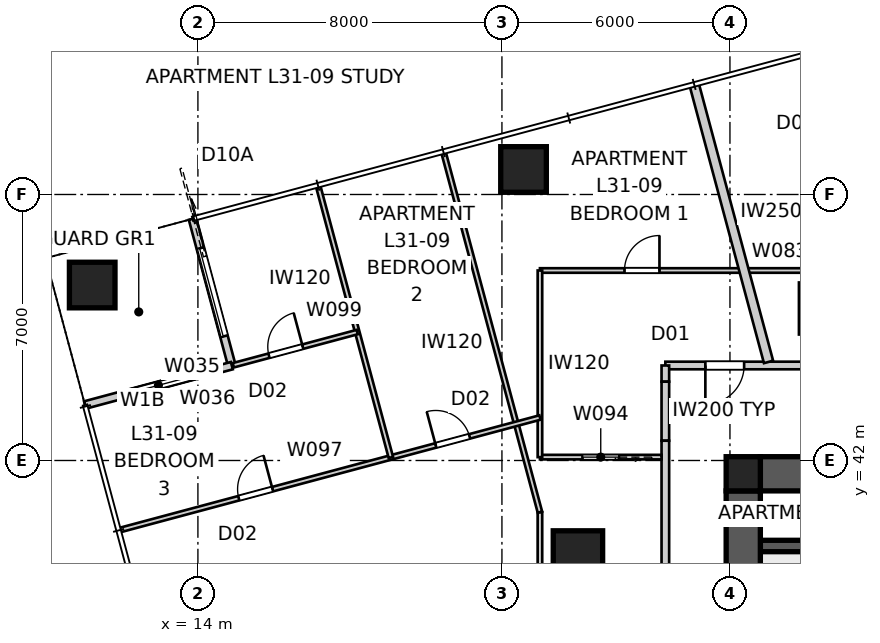
"""IFC4 building model, lengths in metres.
Left out: names, types, materials, properties, quantities, classifications, styles, units other than length and angle.
Written with IfcOpenShell. Run it as: python <this file> out.ifc"""

import sys

from ifc_helpers import new_model, si_unit, direction, frame, frame_2d, origin, origin_2d, place, context, subcontext, project, spatial, polyline, rectangle, outline, extrude, element, fill, save


model = new_model("IFC4")
c1 = context("Model", 3, precision=1e-05, world=origin(), true_north=direction((0.0, 1.0)))
c2 = subcontext(c1, "Body", "Model", "MODEL_VIEW")
j1 = project(units=[si_unit("LENGTHUNIT", "METRE"), si_unit("PLANEANGLEUNIT", "RADIAN")], contexts=[c1])
p1 = place(None, origin())
s1 = spatial("IfcSite", under=j1, at=p1, CompositionType="ELEMENT")
p2 = place(p1, origin())
s2 = spatial("IfcBuilding", under=s1, at=p2, CompositionType="ELEMENT")
p3 = place(p2, frame((0.0, 0.0, 115.0)))
s3 = spatial("IfcBuildingStorey", under=s2, at=p3, CompositionType="ELEMENT", Elevation=115.0)
p4 = place(p3, frame((28.8, 41.65, 0.0), z_axis=(0.0, 0.0, 1.0), x_axis=(1.0, 0.0, 0.0)))
e1 = element("IfcWall", 1, at=p4, inside=s3, PredefinedType="SHEAR", context=c2, shape_type="SweptSolid", body=[
    extrude(outline(polyline([(0.0, -0.45), (22.4, -0.45), (22.4, -0.025), (22.85, -0.025), (22.85, 0.025), (22.4, 0.025), (22.4, 0.45), (0.0, 0.45), (0.0, 0.025), (-0.45, 0.025), (-0.45, -0.025), (0.0, -0.025), (0.0, -0.45)])), origin(), (0.0, 0.0, 1.0), 3.4),
])
p5 = place(p3, frame((28.35, 41.2, 0.0), z_axis=(0.0, 0.0, 1.0), x_axis=(0.0, -1.0, 0.0)))
e2 = element("IfcWall", 2, at=p5, inside=s3, PredefinedType="SHEAR", context=c2, shape_type="SweptSolid", body=[
    extrude(outline(polyline([(0.0, -0.45), (22.4, -0.45), (22.4, -0.025), (22.85, -0.025), (22.85, 0.025), (22.4, 0.025), (22.4, 0.45), (0.0, 0.45), (0.0, 0.025), (-0.45, 0.025), (-0.45, -0.025), (0.0, -0.025), (0.0, -0.45)])), origin(), (0.0, 0.0, 1.0), 3.4),
])
p6 = place(p5, frame((11.14, 0.0, 0.0)))
e3 = element("IfcOpeningElement", 3, at=p6, cuts=e2, PredefinedType="OPENING", context=c2, shape_type="SweptSolid", body=[
    extrude(rectangle(XDim=1.02, YDim=2.4, at=frame_2d((0.51, 1.2))), frame((0.0, 0.46, 0.0), z_axis=(0.0, -1.0, 0.0), x_axis=(1.0, 0.0, 0.0)), (0.0, 0.0, 1.0), 0.92),
])
p7 = place(p3, frame((28.8, 39.75, 0.0), z_axis=(0.0, 0.0, 1.0), x_axis=(1.0, 0.0, 0.0)))
e4 = element("IfcWall", 4, at=p7, inside=s3, PredefinedType="SHEAR", context=c2, shape_type="SweptSolid", body=[
    extrude(rectangle(XDim=3.5, YDim=0.3, at=frame_2d((1.75, 0.0))), origin(), (0.0, 0.0, 1.0), 3.4),
])
p8 = place(p3, frame((28.35, 41.65, 0.0), z_axis=(0.0, 0.0, 1.0), x_axis=(1.0, 0.0, 0.0)))
e5 = element("IfcColumn", 5, at=p8, inside=s3, PredefinedType="COLUMN", context=c2, shape_type="SweptSolid", body=[
    extrude(rectangle(XDim=0.9, YDim=0.9, at=origin_2d()), origin(), (0.0, 0.0, 1.0), 3.4),
])
for number, where, z_axis, x_axis in (
    (6, (22.568, 49.658, 0.0), (0.0, 0.0, 1.0), (1.0, 0.0, 0.0)),
    (7, (11.219, 46.617, 0.0), (0.0, 0.0, 1.0), (1.0, 0.0, 0.0)),
):
    element("IfcColumn", number, at=place(p3, frame(where, z_axis=z_axis, x_axis=x_axis)), inside=s3, PredefinedType="COLUMN", context=c2, shape_type="SweptSolid", body=[
        extrude(rectangle(XDim=1.2, YDim=1.2, at=origin_2d()), origin(), (0.0, 0.0, 1.0), 3.4),
    ])
for number, where, z_axis, x_axis in (
    (8, (30.5, 46.0, 0.0), (0.0, 0.0, 1.0), (1.0, 0.0, 0.0)),
    (9, (24.0, 39.5, 0.0), (0.0, 0.0, 1.0), (1.0, 0.0, 0.0)),
):
    element("IfcColumn", number, at=place(p3, frame(where, z_axis=z_axis, x_axis=x_axis)), inside=s3, PredefinedType="COLUMN", context=c2, shape_type="SweptSolid", body=[
        extrude(rectangle(XDim=1.3, YDim=1.3, at=origin_2d()), origin(), (0.0, 0.0, 1.0), 3.4),
    ])
p9 = place(p3, frame((13.857, 48.359, 0.0), z_axis=(0.0, 0.0, 1.0), x_axis=(0.258843877716, -0.965919172068, 0.0)))
e10 = element("IfcWall", 10, at=p9, inside=s3, PredefinedType="SOLIDWALL", context=c2, shape_type="SweptSolid", body=[
    extrude(rectangle(XDim=4.0, YDim=0.2, at=frame_2d((2.0, 0.0))), origin(), (0.0, 0.0, 1.0), 3.25),
])
p10 = place(p9, frame((0.8, 0.0, 0.0)))
e11 = element("IfcOpeningElement", 11, at=p10, cuts=e10, PredefinedType="OPENING", context=c2, shape_type="SweptSolid", body=[
    extrude(rectangle(XDim=2.4, YDim=2.1, at=frame_2d((1.2, 1.05))), frame((0.0, 0.11, 0.0), z_axis=(0.0, -1.0, 0.0), x_axis=(1.0, 0.0, 0.0)), (0.0, 0.0, 1.0), 0.22),
])
p11 = place(p3, frame((14.893, 44.496, 0.0), z_axis=(0.0, 0.0, 1.0), x_axis=(-0.965934430412, -0.258786931944, 0.0)))
e12 = element("IfcWall", 12, at=p11, inside=s3, PredefinedType="SOLIDWALL", context=c2, shape_type="SweptSolid", body=[
    extrude(rectangle(XDim=4.0, YDim=0.2, at=frame_2d((2.0, 0.0))), origin(), (0.0, 0.0, 1.0), 3.25),
])
p12 = place(p11, frame((1.0, 0.0, 0.45)))
e13 = element("IfcOpeningElement", 13, at=p12, cuts=e12, PredefinedType="OPENING", context=c2, shape_type="SweptSolid", body=[
    extrude(rectangle(XDim=2.0, YDim=1.8, at=frame_2d((1.0, 0.9))), frame((0.0, 0.11, 0.0), z_axis=(0.0, -1.0, 0.0), x_axis=(1.0, 0.0, 0.0)), (0.0, 0.0, 1.0), 0.22),
])
p13 = place(p3, frame((54.5, 44.5, 0.0), z_axis=(0.0, 0.0, 1.0), x_axis=(-1.0, 0.0, 0.0)))
e14 = element("IfcWall", 14, at=p13, inside=s3, PredefinedType="PARTITIONING", context=c2, shape_type="SweptSolid", body=[
    extrude(rectangle(XDim=28.2, YDim=0.2, at=frame_2d((14.1, 0.0))), origin(), (0.0, 0.0, 1.0), 3.25),
])
p14 = place(p13, frame((10.837, 0.0, 0.0)))
e15 = element("IfcOpeningElement", 15, at=p14, cuts=e14, PredefinedType="OPENING", context=c2, shape_type="SweptSolid", body=[
    extrude(rectangle(XDim=1.02, YDim=2.34, at=frame_2d((0.51, 1.17))), frame((0.0, 0.11, 0.0), z_axis=(0.0, -1.0, 0.0), x_axis=(1.0, 0.0, 0.0)), (0.0, 0.0, 1.0), 0.22),
])
p15 = place(p13, frame((5.7, 0.0, 0.0)))
e16 = element("IfcOpeningElement", 16, at=p15, cuts=e14, PredefinedType="OPENING", context=c2, shape_type="SweptSolid", body=[
    extrude(rectangle(XDim=1.02, YDim=2.34, at=frame_2d((0.51, 1.17))), frame((0.0, 0.11, 0.0), z_axis=(0.0, -1.0, 0.0), x_axis=(1.0, 0.0, 0.0)), (0.0, 0.0, 1.0), 0.22),
])
p16 = place(p13, frame((26.127, 0.0, 0.0)))
e17 = element("IfcOpeningElement", 17, at=p16, cuts=e14, PredefinedType="OPENING", context=c2, shape_type="SweptSolid", body=[
    extrude(rectangle(XDim=1.02, YDim=2.34, at=frame_2d((0.51, 1.17))), frame((0.0, 0.11, 0.0), z_axis=(0.0, -1.0, 0.0), x_axis=(1.0, 0.0, 0.0)), (0.0, 0.0, 1.0), 0.22),
])
p17 = place(p3, frame((26.3, 44.5, 0.0), z_axis=(0.0, 0.0, 1.0), x_axis=(0.0, -1.0, 0.0)))
e18 = element("IfcWall", 18, at=p17, inside=s3, PredefinedType="PARTITIONING", context=c2, shape_type="SweptSolid", body=[
    extrude(rectangle(XDim=0.426, YDim=0.2, at=frame_2d((0.213, 0.0))), origin(), (0.0, 0.0, 1.0), 3.25),
])
p18 = place(p3, frame((26.3, 44.074, 0.0), z_axis=(0.0, 0.0, 1.0), x_axis=(0.0, -1.0, 0.0)))
e19 = element("IfcWall", 19, at=p18, inside=s3, PredefinedType="PARTITIONING", context=c2, shape_type="SweptSolid", body=[
    extrude(rectangle(XDim=1.554, YDim=0.2, at=frame_2d((0.777, 0.0))), origin(), (0.0, 0.0, 1.0), 2.722),
])
p19 = place(p3, frame((26.3, 42.52, 0.0), z_axis=(0.0, 0.0, 1.0), x_axis=(0.0, -1.0, 0.0)))
e20 = element("IfcWall", 20, at=p19, inside=s3, PredefinedType="PARTITIONING", context=c2, shape_type="SweptSolid", body=[
    extrude(rectangle(XDim=27.02, YDim=0.2, at=frame_2d((13.51, 0.0))), origin(), (0.0, 0.0, 1.0), 3.25),
])
p20 = place(p19, frame((23.584, 0.0, 0.0)))
e21 = element("IfcOpeningElement", 21, at=p20, cuts=e20, PredefinedType="OPENING", context=c2, shape_type="SweptSolid", body=[
    extrude(rectangle(XDim=1.02, YDim=2.1, at=frame_2d((0.51, 1.05))), frame((0.0, 0.11, 0.0), z_axis=(0.0, -1.0, 0.0), x_axis=(1.0, 0.0, 0.0)), (0.0, 0.0, 1.0), 0.22),
])
p21 = place(p19, frame((13.468, 0.0, 0.0)))
e22 = element("IfcOpeningElement", 22, at=p21, cuts=e20, PredefinedType="OPENING", context=c2, shape_type="SweptSolid", body=[
    extrude(rectangle(XDim=1.02, YDim=2.34, at=frame_2d((0.51, 1.17))), frame((0.0, 0.11, 0.0), z_axis=(0.0, -1.0, 0.0), x_axis=(1.0, 0.0, 0.0)), (0.0, 0.0, 1.0), 0.22),
])
p22 = place(p3, frame((27.058, 51.896, 0.0), z_axis=(0.0, 0.0, 1.0), x_axis=(0.258822171171, -0.965924988656, 0.0)))
e23 = element("IfcWall", 23, at=p22, inside=s3, PredefinedType="PARTITIONING", context=c2, shape_type="SweptSolid", body=[
    extrude(rectangle(XDim=7.56, YDim=0.25, at=frame_2d((3.78, 0.0))), origin(), (0.0, 0.0, 1.0), 3.25),
])
p23 = place(p3, frame((23.0, 13.0, 0.0), z_axis=(0.0, 0.0, 1.0), x_axis=(0.0, 1.0, 0.0)))
e24 = element("IfcWall", 24, at=p23, inside=s3, PredefinedType="PARTITIONING", context=c2, shape_type="SweptSolid", body=[
    extrude(rectangle(XDim=27.64, YDim=0.12, at=frame_2d((13.82, 0.0))), origin(), (0.0, 0.0, 1.0), 2.55),
])
p24 = place(p23, frame((3.192, 0.0, 0.0)))
e25 = element("IfcOpeningElement", 25, at=p24, cuts=e24, PredefinedType="OPENING", context=c2, shape_type="SweptSolid", body=[
    extrude(rectangle(XDim=0.92, YDim=2.34, at=frame_2d((0.46, 1.17))), frame((0.0, 0.07, 0.0), z_axis=(0.0, -1.0, 0.0), x_axis=(1.0, 0.0, 0.0)), (0.0, 0.0, 1.0), 0.14),
])
p25 = place(p23, frame((13.779, 0.0, 0.0)))
e26 = element("IfcOpeningElement", 26, at=p25, cuts=e24, PredefinedType="OPENING", context=c2, shape_type="SweptSolid", body=[
    extrude(rectangle(XDim=0.92, YDim=2.34, at=frame_2d((0.46, 1.17))), frame((0.0, 0.07, 0.0), z_axis=(0.0, -1.0, 0.0), x_axis=(1.0, 0.0, 0.0)), (0.0, 0.0, 1.0), 0.14),
])
p26 = place(p23, frame((16.374, 0.0, 0.0)))
e27 = element("IfcOpeningElement", 27, at=p26, cuts=e24, PredefinedType="OPENING", context=c2, shape_type="SweptSolid", body=[
    extrude(rectangle(XDim=0.92, YDim=2.34, at=frame_2d((0.46, 1.17))), frame((0.0, 0.07, 0.0), z_axis=(0.0, -1.0, 0.0), x_axis=(1.0, 0.0, 0.0)), (0.0, 0.0, 1.0), 0.14),
])
p27 = place(p23, frame((9.743, 0.0, 0.0)))
e28 = element("IfcOpeningElement", 28, at=p27, cuts=e24, PredefinedType="OPENING", context=c2, shape_type="SweptSolid", body=[
    extrude(rectangle(XDim=0.96, YDim=2.1, at=frame_2d((0.48, 1.05))), frame((0.0, 0.07, 0.0), z_axis=(0.0, -1.0, 0.0), x_axis=(1.0, 0.0, 0.0)), (0.0, 0.0, 1.0), 0.14),
])
p28 = place(p23, frame((24.879, 0.0, 0.0)))
e29 = element("IfcOpeningElement", 29, at=p28, cuts=e24, PredefinedType="OPENING", context=c2, shape_type="SweptSolid", body=[
    extrude(rectangle(XDim=0.96, YDim=2.1, at=frame_2d((0.48, 1.05))), frame((0.0, 0.07, 0.0), z_axis=(0.0, -1.0, 0.0), x_axis=(1.0, 0.0, 0.0)), (0.0, 0.0, 1.0), 0.14),
])
p29 = place(p3, frame((23.0, 47.0, 0.0), z_axis=(0.0, 0.0, 1.0), x_axis=(1.0, 0.0, 0.0)))
e30 = element("IfcWall", 30, at=p29, inside=s3, PredefinedType="PARTITIONING", context=c2, shape_type="SweptSolid", body=[
    extrude(rectangle(XDim=25.241, YDim=0.12, at=frame_2d((12.62, 0.0))), origin(), (0.0, 0.0, 1.0), 2.55),
])
p30 = place(p29, frame((21.702, 0.0, 0.0)))
e31 = element("IfcOpeningElement", 31, at=p30, cuts=e30, PredefinedType="OPENING", context=c2, shape_type="SweptSolid", body=[
    extrude(rectangle(XDim=0.92, YDim=2.34, at=frame_2d((0.46, 1.17))), frame((0.0, 0.07, 0.0), z_axis=(0.0, -1.0, 0.0), x_axis=(1.0, 0.0, 0.0)), (0.0, 0.0, 1.0), 0.14),
])
p31 = place(p29, frame((17.598, 0.0, 0.0)))
e32 = element("IfcOpeningElement", 32, at=p31, cuts=e30, PredefinedType="OPENING", context=c2, shape_type="SweptSolid", body=[
    extrude(rectangle(XDim=0.92, YDim=2.34, at=frame_2d((0.46, 1.17))), frame((0.0, 0.07, 0.0), z_axis=(0.0, -1.0, 0.0), x_axis=(1.0, 0.0, 0.0)), (0.0, 0.0, 1.0), 0.14),
])
p32 = place(p29, frame((23.689, 0.0, 0.0)))
e33 = element("IfcOpeningElement", 33, at=p32, cuts=e30, PredefinedType="OPENING", context=c2, shape_type="SweptSolid", body=[
    extrude(rectangle(XDim=0.92, YDim=2.34, at=frame_2d((0.46, 1.17))), frame((0.0, 0.07, 0.0), z_axis=(0.0, -1.0, 0.0), x_axis=(1.0, 0.0, 0.0)), (0.0, 0.0, 1.0), 0.14),
])
p33 = place(p29, frame((2.225, 0.0, 0.0)))
e34 = element("IfcOpeningElement", 34, at=p33, cuts=e30, PredefinedType="OPENING", context=c2, shape_type="SweptSolid", body=[
    extrude(rectangle(XDim=0.92, YDim=2.34, at=frame_2d((0.46, 1.17))), frame((0.0, 0.07, 0.0), z_axis=(0.0, -1.0, 0.0), x_axis=(1.0, 0.0, 0.0)), (0.0, 0.0, 1.0), 0.14),
])
p34 = place(p29, frame((13.709, 0.0, 0.0)))
e35 = element("IfcOpeningElement", 35, at=p34, cuts=e30, PredefinedType="OPENING", context=c2, shape_type="SweptSolid", body=[
    extrude(rectangle(XDim=0.96, YDim=2.1, at=frame_2d((0.48, 1.05))), frame((0.0, 0.07, 0.0), z_axis=(0.0, -1.0, 0.0), x_axis=(1.0, 0.0, 0.0)), (0.0, 0.0, 1.0), 0.14),
])
p35 = place(p3, frame((26.2, 42.089, 0.0), z_axis=(0.0, 0.0, 1.0), x_axis=(-1.0, 0.0, 0.0)))
e36 = element("IfcWall", 36, at=p35, inside=s3, PredefinedType="PARTITIONING", context=c2, shape_type="SweptSolid", body=[
    extrude(rectangle(XDim=3.2, YDim=0.12, at=frame_2d((1.6, 0.0))), origin(), (0.0, 0.0, 1.0), 3.25),
])
p36 = place(p35, frame((1.12, 0.0, 0.0)))
e37 = element("IfcOpeningElement", 37, at=p36, cuts=e36, PredefinedType="OPENING", context=c2, shape_type="SweptSolid", body=[
    extrude(rectangle(XDim=0.96, YDim=2.1, at=frame_2d((0.48, 1.05))), frame((0.0, 0.07, 0.0), z_axis=(0.0, -1.0, 0.0), x_axis=(1.0, 0.0, 0.0)), (0.0, 0.0, 1.0), 0.14),
])
p37 = place(p3, frame((23.0, 42.089, 0.0), z_axis=(0.0, 0.0, 1.0), x_axis=(0.0, 1.0, 0.0)))
e38 = element("IfcWall", 38, at=p37, inside=s3, PredefinedType="PARTITIONING", context=c2, shape_type="SweptSolid", body=[
    extrude(rectangle(XDim=4.911, YDim=0.12, at=frame_2d((2.456, 0.0))), origin(), (0.0, 0.0, 1.0), 3.25),
])
p38 = place(p3, frame((23.0, 40.64, 0.0), z_axis=(0.0, 0.0, 1.0), x_axis=(-0.258790139317, 0.965933571108, 0.0)))
e39 = element("IfcWall", 39, at=p38, inside=s3, PredefinedType="PARTITIONING", context=c2, shape_type="SweptSolid", body=[
    extrude(rectangle(XDim=9.783, YDim=0.12, at=frame_2d((4.892, 0.0))), origin(), (0.0, 0.0, 1.0), 2.638),
])
p39 = place(p3, frame((11.952, 40.17, 0.0), z_axis=(0.0, 0.0, 1.0), x_axis=(0.965923183761, 0.258828906952, 0.0)))
e40 = element("IfcWall", 40, at=p39, inside=s3, PredefinedType="PARTITIONING", context=c2, shape_type="SweptSolid", body=[
    extrude(rectangle(XDim=11.438, YDim=0.12, at=frame_2d((5.719, 0.0))), origin(), (0.0, 0.0, 1.0), 3.25),
])
p40 = place(p39, frame((3.233, 0.0, 0.0)))
e41 = element("IfcOpeningElement", 41, at=p40, cuts=e40, PredefinedType="OPENING", context=c2, shape_type="SweptSolid", body=[
    extrude(rectangle(XDim=0.92, YDim=2.34, at=frame_2d((0.46, 1.17))), frame((0.0, 0.07, 0.0), z_axis=(0.0, -1.0, 0.0), x_axis=(1.0, 0.0, 0.0)), (0.0, 0.0, 1.0), 0.14),
])
p41 = place(p39, frame((8.6, 0.0, 0.0)))
e42 = element("IfcOpeningElement", 42, at=p41, cuts=e40, PredefinedType="OPENING", context=c2, shape_type="SweptSolid", body=[
    extrude(rectangle(XDim=0.92, YDim=2.34, at=frame_2d((0.46, 1.17))), frame((0.0, 0.07, 0.0), z_axis=(0.0, -1.0, 0.0), x_axis=(1.0, 0.0, 0.0)), (0.0, 0.0, 1.0), 0.14),
])
p42 = place(p3, frame((19.077, 42.08, 0.0), z_axis=(0.0, 0.0, 1.0), x_axis=(-0.258846923464, 0.965918355874, 0.0)))
e43 = element("IfcWall", 43, at=p42, inside=s3, PredefinedType="PARTITIONING", context=c2, shape_type="SweptSolid", body=[
    extrude(rectangle(XDim=7.377, YDim=0.12, at=frame_2d((3.688, 0.0))), origin(), (0.0, 0.0, 1.0), 3.25),
])
p43 = place(p3, frame((14.931, 44.506, 0.0), z_axis=(0.0, 0.0, 1.0), x_axis=(0.96593546512, 0.258783069815, 0.0)))
e44 = element("IfcWall", 44, at=p43, inside=s3, PredefinedType="PARTITIONING", context=c2, shape_type="SweptSolid", body=[
    extrude(rectangle(XDim=3.376, YDim=0.12, at=frame_2d((1.688, 0.0))), origin(), (0.0, 0.0, 1.0), 3.25),
])
p44 = place(p43, frame((0.971, 0.0, 0.0)))
e45 = element("IfcOpeningElement", 45, at=p44, cuts=e44, PredefinedType="OPENING", context=c2, shape_type="SweptSolid", body=[
    extrude(rectangle(XDim=0.92, YDim=2.34, at=frame_2d((0.46, 1.17))), frame((0.0, 0.07, 0.0), z_axis=(0.0, -1.0, 0.0), x_axis=(1.0, 0.0, 0.0)), (0.0, 0.0, 1.0), 0.14),
])
p45 = place(p10, origin())
e46 = element("IfcDoor", 46, at=p45, inside=s3, OperationType="SLIDING_TO_LEFT", PredefinedType="DOOR", context=c2, shape_type="SweptSolid", body=[
    extrude(rectangle(XDim=2.4, YDim=2.1, at=frame_2d((1.2, 1.05))), frame((0.0, 0.025, 0.0), z_axis=(0.0, -1.0, 0.0), x_axis=(1.0, 0.0, 0.0)), (0.0, 0.0, 1.0), 0.05),
])
fill(e11, e46)
p46 = place(p12, origin())
e47 = element("IfcWindow", 47, at=p46, inside=s3, PartitioningType="SINGLE_PANEL", PredefinedType="WINDOW", context=c2, shape_type="SweptSolid", body=[
    extrude(rectangle(XDim=2.0, YDim=1.8, at=frame_2d((1.0, 0.9))), frame((0.0, 0.03, 0.0), z_axis=(0.0, -1.0, 0.0), x_axis=(1.0, 0.0, 0.0)), (0.0, 0.0, 1.0), 0.06),
])
fill(e13, e47)
p47 = place(p16, origin())
e48 = element("IfcDoor", 48, at=p47, inside=s3, OperationType="SINGLE_SWING_RIGHT", PredefinedType="DOOR", context=c2, shape_type="SweptSolid", body=[
    extrude(rectangle(XDim=1.02, YDim=2.34, at=frame_2d((0.51, 1.17))), frame((0.0, 0.025, 0.0), z_axis=(0.0, -1.0, 0.0), x_axis=(1.0, 0.0, 0.0)), (0.0, 0.0, 1.0), 0.05),
])
fill(e17, e48)
p48 = place(p33, origin())
e49 = element("IfcDoor", 49, at=p48, inside=s3, OperationType="SINGLE_SWING_RIGHT", PredefinedType="DOOR", context=c2, shape_type="SweptSolid", body=[
    extrude(rectangle(XDim=0.92, YDim=2.34, at=frame_2d((0.46, 1.17))), frame((0.0, 0.025, 0.0), z_axis=(0.0, -1.0, 0.0), x_axis=(1.0, 0.0, 0.0)), (0.0, 0.0, 1.0), 0.05),
])
fill(e34, e49)
p49 = place(p36, origin())
e50 = element("IfcDoor", 50, at=p49, inside=s3, OperationType="SLIDING_TO_LEFT", PredefinedType="DOOR", context=c2, shape_type="SweptSolid", body=[
    extrude(rectangle(XDim=0.96, YDim=2.1, at=frame_2d((0.48, 1.05))), frame((0.0, 0.025, 0.0), z_axis=(0.0, -1.0, 0.0), x_axis=(1.0, 0.0, 0.0)), (0.0, 0.0, 1.0), 0.05),
])
fill(e37, e50)
p50 = place(p40, origin())
e51 = element("IfcDoor", 51, at=p50, inside=s3, OperationType="SINGLE_SWING_RIGHT", PredefinedType="DOOR", context=c2, shape_type="SweptSolid", body=[
    extrude(rectangle(XDim=0.92, YDim=2.34, at=frame_2d((0.46, 1.17))), frame((0.0, 0.025, 0.0), z_axis=(0.0, -1.0, 0.0), x_axis=(1.0, 0.0, 0.0)), (0.0, 0.0, 1.0), 0.05),
])
fill(e41, e51)
p51 = place(p41, origin())
e52 = element("IfcDoor", 52, at=p51, inside=s3, OperationType="SINGLE_SWING_LEFT", PredefinedType="DOOR", context=c2, shape_type="SweptSolid", body=[
    extrude(rectangle(XDim=0.92, YDim=2.34, at=frame_2d((0.46, 1.17))), frame((0.0, 0.025, 0.0), z_axis=(0.0, -1.0, 0.0), x_axis=(1.0, 0.0, 0.0)), (0.0, 0.0, 1.0), 0.05),
])
fill(e42, e52)
p52 = place(p44, origin())
e53 = element("IfcDoor", 53, at=p52, inside=s3, OperationType="SINGLE_SWING_RIGHT", PredefinedType="DOOR", context=c2, shape_type="SweptSolid", body=[
    extrude(rectangle(XDim=0.92, YDim=2.34, at=frame_2d((0.46, 1.17))), frame((0.0, 0.025, 0.0), z_axis=(0.0, -1.0, 0.0), x_axis=(1.0, 0.0, 0.0)), (0.0, 0.0, 1.0), 0.05),
])
fill(e45, e53)
save(model, sys.argv[1])
